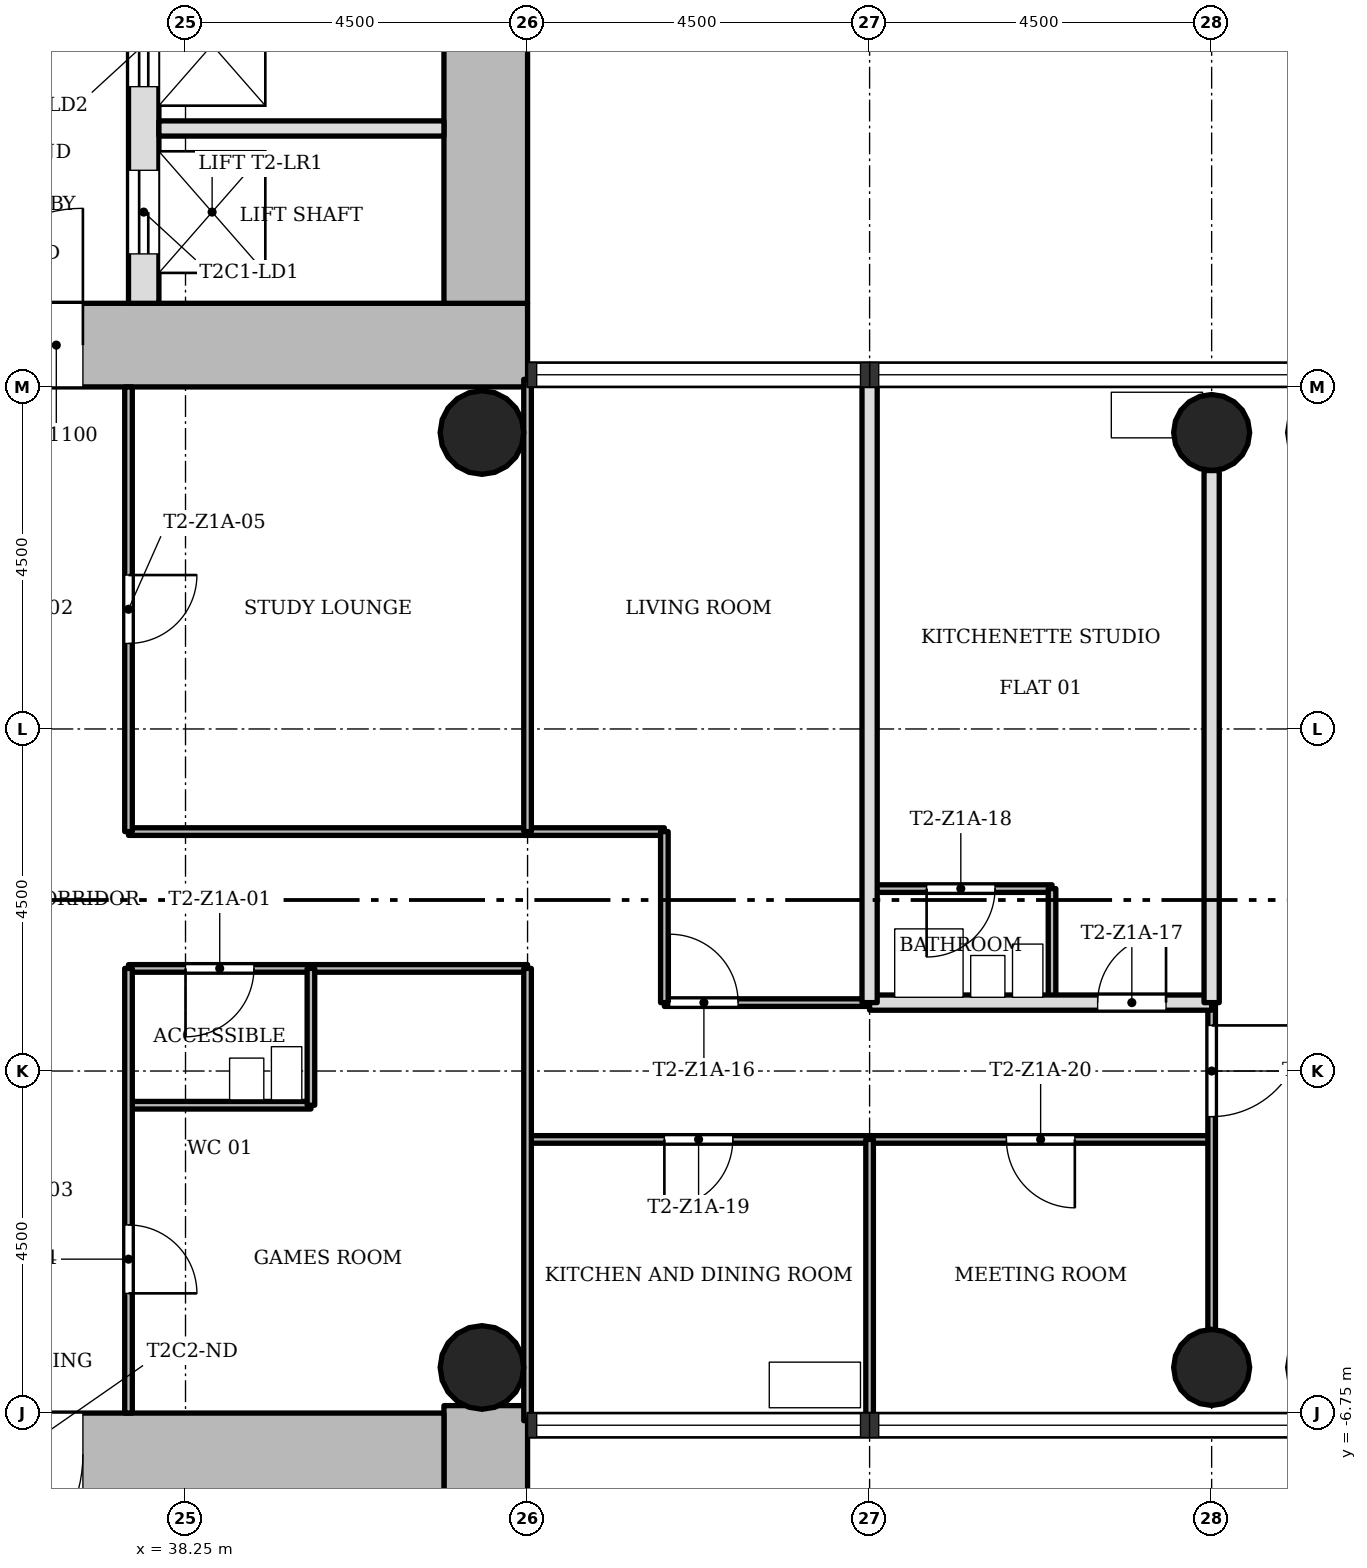
"""IFC4 building model, lengths in metres.
Left out: names, types, materials, properties, quantities, classifications, styles, units other than length and angle.
Written with IfcOpenShell. Run it as: python <this file> out.ifc"""

import sys

from ifc_helpers import new_model, si_unit, direction, frame, frame_2d, origin, origin_2d, place, context, subcontext, project, spatial, rectangle, hollow_circle, extrude, element, fill, save


model = new_model("IFC4")
c1 = context("Model", 3, precision=1e-05, world=origin(), true_north=direction((0.0, 1.0)))
c2 = subcontext(c1, "Body", "Model", "MODEL_VIEW")
j1 = project(units=[si_unit("LENGTHUNIT", "METRE"), si_unit("PLANEANGLEUNIT", "RADIAN")], contexts=[c1])
p1 = place(None, origin())
s1 = spatial("IfcSite", under=j1, at=p1, CompositionType="ELEMENT")
p2 = place(p1, origin())
s2 = spatial("IfcBuilding", under=s1, at=p2, CompositionType="ELEMENT")
p3 = place(p2, frame((0.0, 0.0, 27.9)))
s3 = spatial("IfcBuildingStorey", under=s2, at=p3, CompositionType="ELEMENT", Elevation=27.9)
p4 = place(p3, frame((30.35, 7.3, 0.0), z_axis=(0.0, 0.0, 1.0), x_axis=(1.0, 0.0, 0.0)))
e1 = element("IfcWall", 1, at=p4, inside=s3, PredefinedType="SHEAR", context=c2, shape_type="SweptSolid", body=[
    extrude(rectangle(XDim=12.4, YDim=1.1, at=frame_2d((6.2, 0.0))), origin(), (0.0, 0.0, 1.0), 3.4),
])
p5 = place(p4, frame((4.75, 0.0, 0.0)))
e2 = element("IfcOpeningElement", 2, at=p5, cuts=e1, PredefinedType="OPENING", context=c2, shape_type="SweptSolid", body=[
    extrude(rectangle(XDim=1.8, YDim=2.1, at=frame_2d((0.9, 1.05))), frame((0.0, 0.56, 0.0), z_axis=(0.0, -1.0, 0.0), x_axis=(1.0, 0.0, 0.0)), (0.0, 0.0, 1.0), 1.12),
])
p6 = place(p3, frame((42.2, 7.85, 0.0), z_axis=(0.0, 0.0, 1.0), x_axis=(0.0, 1.0, 0.0)))
e3 = element("IfcWall", 3, at=p6, inside=s3, PredefinedType="SHEAR", context=c2, shape_type="SweptSolid", body=[
    extrude(rectangle(XDim=7.9, YDim=1.1, at=frame_2d((3.95, 0.0))), origin(), (0.0, 0.0, 1.0), 3.4),
])
p7 = place(p3, frame((37.7, 7.85, 0.0), z_axis=(0.0, 0.0, 1.0), x_axis=(0.0, 1.0, 0.0)))
e4 = element("IfcWall", 4, at=p7, inside=s3, PredefinedType="SHEAR", context=c2, shape_type="SweptSolid", body=[
    extrude(rectangle(XDim=6.8, YDim=0.4, at=frame_2d((3.4, 0.0))), origin(), (0.0, 0.0, 1.0), 3.4),
])
p8 = place(p7, frame((0.65, 0.0, 0.0)))
e5 = element("IfcOpeningElement", 5, at=p8, cuts=e4, PredefinedType="OPENING", context=c2, shape_type="SweptSolid", body=[
    extrude(rectangle(XDim=1.1, YDim=2.1, at=frame_2d((0.55, 1.05))), frame((0.0, 0.21, 0.0), z_axis=(0.0, -1.0, 0.0), x_axis=(1.0, 0.0, 0.0)), (0.0, 0.0, 1.0), 0.42),
])
p9 = place(p7, frame((2.85, 0.0, 0.0)))
e6 = element("IfcOpeningElement", 6, at=p9, cuts=e4, PredefinedType="OPENING", context=c2, shape_type="SweptSolid", body=[
    extrude(rectangle(XDim=1.1, YDim=2.1, at=frame_2d((0.55, 1.05))), frame((0.0, 0.21, 0.0), z_axis=(0.0, -1.0, 0.0), x_axis=(1.0, 0.0, 0.0)), (0.0, 0.0, 1.0), 0.42),
])
p10 = place(p7, frame((5.05, 0.0, 0.0)))
e7 = element("IfcOpeningElement", 7, at=p10, cuts=e4, PredefinedType="OPENING", context=c2, shape_type="SweptSolid", body=[
    extrude(rectangle(XDim=1.1, YDim=2.1, at=frame_2d((0.55, 1.05))), frame((0.0, 0.21, 0.0), z_axis=(0.0, -1.0, 0.0), x_axis=(1.0, 0.0, 0.0)), (0.0, 0.0, 1.0), 0.42),
])
p11 = place(p3, frame((42.2, -15.248, 0.0), z_axis=(0.0, 0.0, 1.0), x_axis=(0.0, 1.0, 0.0)))
e8 = element("IfcWall", 8, at=p11, inside=s3, PredefinedType="SHEAR", context=c2, shape_type="SweptSolid", body=[
    extrude(rectangle(XDim=8.596, YDim=1.1, at=frame_2d((4.298, 0.0))), origin(), (0.0, 0.0, 1.0), 3.4),
])
p12 = place(p3, frame((41.65, -7.3, 0.0), z_axis=(0.0, 0.0, 1.0), x_axis=(-1.0, 0.0, 0.0)))
e9 = element("IfcWall", 9, at=p12, inside=s3, PredefinedType="SHEAR", context=c2, shape_type="SweptSolid", body=[
    extrude(rectangle(XDim=12.4, YDim=1.1, at=frame_2d((6.2, 0.0))), origin(), (0.0, 0.0, 1.0), 3.4),
])
p13 = place(p12, frame((4.75, 0.0, 0.0)))
e10 = element("IfcOpeningElement", 10, at=p13, cuts=e9, PredefinedType="OPENING", context=c2, shape_type="SweptSolid", body=[
    extrude(rectangle(XDim=1.8, YDim=2.1, at=frame_2d((0.9, 1.05))), frame((0.0, 0.56, 0.0), z_axis=(0.0, -1.0, 0.0), x_axis=(1.0, 0.0, 0.0)), (0.0, 0.0, 1.0), 1.12),
])
for number, where, z_axis, x_axis in (
    (11, (51.75, -6.15, 0.0), (0.0, 0.0, 1.0), (1.0, 0.0, 0.0)),
    (12, (51.75, 6.15, 0.0), (0.0, 0.0, 1.0), (1.0, 0.0, 0.0)),
):
    element("IfcColumn", number, at=place(p3, frame(where, z_axis=z_axis, x_axis=x_axis)), inside=s3, PredefinedType="COLUMN", context=c2, shape_type="SweptSolid", body=[
        extrude(hollow_circle(Radius=0.5, WallThickness=0.036, at=origin_2d()), origin(), (0.0, 0.0, 1.0), 3.4),
    ])
for number, where, z_axis, x_axis in (
    (13, (42.15, -6.15, 0.0), (0.0, 0.0, 1.0), (1.0, 0.0, 0.0)),
    (14, (42.15, 6.15, 0.0), (0.0, 0.0, 1.0), (1.0, 0.0, 0.0)),
):
    element("IfcColumn", number, at=place(p3, frame(where, z_axis=z_axis, x_axis=x_axis)), inside=s3, PredefinedType="COLUMN", context=c2, shape_type="SweptSolid", body=[
        extrude(hollow_circle(Radius=0.55, WallThickness=0.04, at=origin_2d()), origin(), (0.0, 0.0, 1.0), 3.4),
    ])
p14 = place(p3, frame((41.65, 10.15, 0.0), z_axis=(0.0, 0.0, 1.0), x_axis=(-1.0, 0.0, 0.0)))
e15 = element("IfcWall", 15, at=p14, inside=s3, PredefinedType="SOLIDWALL", context=c2, shape_type="SweptSolid", body=[
    extrude(rectangle(XDim=3.75, YDim=0.2, at=frame_2d((1.875, 0.0))), origin(), (0.0, 0.0, 1.0), 3.0),
])
p15 = place(p3, frame((51.75, -3.15, 0.0), z_axis=(0.0, 0.0, 1.0), x_axis=(-1.0, 0.0, 0.0)))
e16 = element("IfcWall", 16, at=p15, inside=s3, PredefinedType="PARTITIONING", context=c2, shape_type="SweptSolid", body=[
    extrude(rectangle(XDim=9.0, YDim=0.1, at=frame_2d((4.5, 0.0))), origin(), (0.0, 0.0, 1.0), 3.0),
])
p16 = place(p15, frame((6.3, 0.0, 0.0)))
e17 = element("IfcOpeningElement", 17, at=p16, cuts=e16, PredefinedType="OPENING", context=c2, shape_type="SweptSolid", body=[
    extrude(rectangle(XDim=0.9, YDim=2.1, at=frame_2d((0.45, 1.05))), frame((0.0, 0.06, 0.0), z_axis=(0.0, -1.0, 0.0), x_axis=(1.0, 0.0, 0.0)), (0.0, 0.0, 1.0), 0.12),
])
p17 = place(p15, frame((1.8, 0.0, 0.0)))
e18 = element("IfcOpeningElement", 18, at=p17, cuts=e16, PredefinedType="OPENING", context=c2, shape_type="SweptSolid", body=[
    extrude(rectangle(XDim=0.9, YDim=2.1, at=frame_2d((0.45, 1.05))), frame((0.0, 0.06, 0.0), z_axis=(0.0, -1.0, 0.0), x_axis=(1.0, 0.0, 0.0)), (0.0, 0.0, 1.0), 0.12),
])
p18 = place(p3, frame((39.9, -2.7, 0.0), z_axis=(0.0, 0.0, 1.0), x_axis=(-1.0, 0.0, 0.0)))
e19 = element("IfcWall", 19, at=p18, inside=s3, PredefinedType="PARTITIONING", context=c2, shape_type="SweptSolid", body=[
    extrude(rectangle(XDim=2.4, YDim=0.1, at=frame_2d((1.2, 0.0))), origin(), (0.0, 0.0, 1.0), 3.0),
])
p19 = place(p3, frame((47.25, -1.35, 0.0), z_axis=(0.0, 0.0, 1.0), x_axis=(-1.0, 0.0, 0.0)))
e20 = element("IfcWall", 20, at=p19, inside=s3, PredefinedType="PARTITIONING", context=c2, shape_type="SweptSolid", body=[
    extrude(rectangle(XDim=2.7, YDim=0.1, at=frame_2d((1.35, 0.0))), origin(), (0.0, 0.0, 1.0), 3.0),
])
p20 = place(p19, frame((1.73, 0.0, 0.0)))
e21 = element("IfcOpeningElement", 21, at=p20, cuts=e20, PredefinedType="OPENING", context=c2, shape_type="SweptSolid", body=[
    extrude(rectangle(XDim=0.9, YDim=2.1, at=frame_2d((0.45, 1.05))), frame((0.0, 0.06, 0.0), z_axis=(0.0, -1.0, 0.0), x_axis=(1.0, 0.0, 0.0)), (0.0, 0.0, 1.0), 0.12),
])
p21 = place(p3, frame((51.75, -1.35, 0.0), z_axis=(0.0, 0.0, 1.0), x_axis=(-1.0, 0.0, 0.0)))
e22 = element("IfcWall", 22, at=p21, inside=s3, PredefinedType="SOLIDWALL", context=c2, shape_type="SweptSolid", body=[
    extrude(rectangle(XDim=4.5, YDim=0.2, at=frame_2d((2.25, 0.0))), origin(), (0.0, 0.0, 1.0), 3.0),
])
p22 = place(p21, frame((0.6, 0.0, 0.0)))
e23 = element("IfcOpeningElement", 23, at=p22, cuts=e22, PredefinedType="OPENING", context=c2, shape_type="SweptSolid", body=[
    extrude(rectangle(XDim=0.9, YDim=2.1, at=frame_2d((0.45, 1.05))), frame((0.0, 0.11, 0.0), z_axis=(0.0, -1.0, 0.0), x_axis=(1.0, 0.0, 0.0)), (0.0, 0.0, 1.0), 0.22),
])
p23 = place(p3, frame((42.75, -0.9, 0.0), z_axis=(0.0, 0.0, 1.0), x_axis=(-1.0, 0.0, 0.0)))
e24 = element("IfcWall", 24, at=p23, inside=s3, PredefinedType="PARTITIONING", context=c2, shape_type="SweptSolid", body=[
    extrude(rectangle(XDim=5.25, YDim=0.1, at=frame_2d((2.625, 0.0))), origin(), (0.0, 0.0, 1.0), 3.0),
])
p24 = place(p23, frame((3.6, 0.0, 0.0)))
e25 = element("IfcOpeningElement", 25, at=p24, cuts=e24, PredefinedType="OPENING", context=c2, shape_type="SweptSolid", body=[
    extrude(rectangle(XDim=0.9, YDim=2.1, at=frame_2d((0.45, 1.05))), frame((0.0, 0.06, 0.0), z_axis=(0.0, -1.0, 0.0), x_axis=(1.0, 0.0, 0.0)), (0.0, 0.0, 1.0), 0.12),
])
p25 = place(p3, frame((49.65, 0.15, 0.0), z_axis=(0.0, 0.0, 1.0), x_axis=(-1.0, 0.0, 0.0)))
e26 = element("IfcWall", 26, at=p25, inside=s3, PredefinedType="PARTITIONING", context=c2, shape_type="SweptSolid", body=[
    extrude(rectangle(XDim=2.4, YDim=0.1, at=frame_2d((1.2, 0.0))), origin(), (0.0, 0.0, 1.0), 3.0),
])
p26 = place(p25, frame((0.75, 0.0, 0.0)))
e27 = element("IfcOpeningElement", 27, at=p26, cuts=e26, PredefinedType="OPENING", context=c2, shape_type="SweptSolid", body=[
    extrude(rectangle(XDim=0.9, YDim=2.1, at=frame_2d((0.45, 1.05))), frame((0.0, 0.06, 0.0), z_axis=(0.0, -1.0, 0.0), x_axis=(1.0, 0.0, 0.0)), (0.0, 0.0, 1.0), 0.12),
])
p27 = place(p3, frame((44.55, 0.9, 0.0), z_axis=(0.0, 0.0, 1.0), x_axis=(-1.0, 0.0, 0.0)))
e28 = element("IfcWall", 28, at=p27, inside=s3, PredefinedType="PARTITIONING", context=c2, shape_type="SweptSolid", body=[
    extrude(rectangle(XDim=7.05, YDim=0.1, at=frame_2d((3.525, 0.0))), origin(), (0.0, 0.0, 1.0), 3.0),
])
p28 = place(p3, frame((51.75, -5.65, 0.0), z_axis=(0.0, 0.0, 1.0), x_axis=(0.0, 1.0, 0.0)))
e29 = element("IfcWall", 29, at=p28, inside=s3, PredefinedType="PARTITIONING", context=c2, shape_type="SweptSolid", body=[
    extrude(rectangle(XDim=4.3, YDim=0.1, at=frame_2d((2.15, 0.0))), origin(), (0.0, 0.0, 1.0), 3.0),
])
p29 = place(p28, frame((2.8, 0.0, 0.0)))
e30 = element("IfcOpeningElement", 30, at=p29, cuts=e29, PredefinedType="OPENING", context=c2, shape_type="SweptSolid", body=[
    extrude(rectangle(XDim=1.2, YDim=2.1, at=frame_2d((0.6, 1.05))), frame((0.0, 0.06, 0.0), z_axis=(0.0, -1.0, 0.0), x_axis=(1.0, 0.0, 0.0)), (0.0, 0.0, 1.0), 0.12),
])
p30 = place(p3, frame((51.75, -1.35, 0.0), z_axis=(0.0, 0.0, 1.0), x_axis=(0.0, 1.0, 0.0)))
e31 = element("IfcWall", 31, at=p30, inside=s3, PredefinedType="SOLIDWALL", context=c2, shape_type="SweptSolid", body=[
    extrude(rectangle(XDim=7.0, YDim=0.2, at=frame_2d((3.5, 0.0))), origin(), (0.0, 0.0, 1.0), 3.0),
])
p31 = place(p3, frame((49.65, -1.35, 0.0), z_axis=(0.0, 0.0, 1.0), x_axis=(0.0, 1.0, 0.0)))
e32 = element("IfcWall", 32, at=p31, inside=s3, PredefinedType="PARTITIONING", context=c2, shape_type="SweptSolid", body=[
    extrude(rectangle(XDim=1.5, YDim=0.1, at=frame_2d((0.75, 0.0))), origin(), (0.0, 0.0, 1.0), 3.0),
])
p32 = place(p3, frame((47.25, -6.85, 0.0), z_axis=(0.0, 0.0, 1.0), x_axis=(0.0, 1.0, 0.0)))
e33 = element("IfcWall", 33, at=p32, inside=s3, PredefinedType="PARTITIONING", context=c2, shape_type="SweptSolid", body=[
    extrude(rectangle(XDim=3.7, YDim=0.1, at=frame_2d((1.85, 0.0))), origin(), (0.0, 0.0, 1.0), 3.0),
])
p33 = place(p3, frame((47.25, -1.35, 0.0), z_axis=(0.0, 0.0, 1.0), x_axis=(0.0, 1.0, 0.0)))
e34 = element("IfcWall", 34, at=p33, inside=s3, PredefinedType="SOLIDWALL", context=c2, shape_type="SweptSolid", body=[
    extrude(rectangle(XDim=8.2, YDim=0.2, at=frame_2d((4.1, 0.0))), origin(), (0.0, 0.0, 1.0), 3.0),
])
p34 = place(p3, frame((44.55, -1.35, 0.0), z_axis=(0.0, 0.0, 1.0), x_axis=(0.0, 1.0, 0.0)))
e35 = element("IfcWall", 35, at=p34, inside=s3, PredefinedType="PARTITIONING", context=c2, shape_type="SweptSolid", body=[
    extrude(rectangle(XDim=2.25, YDim=0.1, at=frame_2d((1.125, 0.0))), origin(), (0.0, 0.0, 1.0), 3.0),
])
for number, where, z_axis, x_axis in (
    (36, (42.75, -6.85, 0.0), (0.0, 0.0, 1.0), (0.0, 1.0, 0.0)),
    (37, (42.75, 0.9, 0.0), (0.0, 0.0, 1.0), (0.0, 1.0, 0.0)),
):
    element("IfcWall", number, at=place(p3, frame(where, z_axis=z_axis, x_axis=x_axis)), inside=s3, PredefinedType="PARTITIONING", context=c2, shape_type="SweptSolid", body=[
        extrude(rectangle(XDim=5.95, YDim=0.1, at=frame_2d((2.975, 0.0))), origin(), (0.0, 0.0, 1.0), 3.0),
    ])
p35 = place(p3, frame((39.9, -2.7, 0.0), z_axis=(0.0, 0.0, 1.0), x_axis=(0.0, 1.0, 0.0)))
e38 = element("IfcWall", 38, at=p35, inside=s3, PredefinedType="PARTITIONING", context=c2, shape_type="SweptSolid", body=[
    extrude(rectangle(XDim=1.8, YDim=0.1, at=frame_2d((0.9, 0.0))), origin(), (0.0, 0.0, 1.0), 3.0),
])
p36 = place(p3, frame((37.5, -6.75, 0.0), z_axis=(0.0, 0.0, 1.0), x_axis=(0.0, 1.0, 0.0)))
e39 = element("IfcWall", 39, at=p36, inside=s3, PredefinedType="PARTITIONING", context=c2, shape_type="SweptSolid", body=[
    extrude(rectangle(XDim=5.85, YDim=0.1, at=frame_2d((2.925, 0.0))), origin(), (0.0, 0.0, 1.0), 3.0),
])
p37 = place(p36, frame((1.575, 0.0, 0.0)))
e40 = element("IfcOpeningElement", 40, at=p37, cuts=e39, PredefinedType="OPENING", context=c2, shape_type="SweptSolid", body=[
    extrude(rectangle(XDim=0.9, YDim=2.1, at=frame_2d((0.45, 1.05))), frame((0.0, 0.06, 0.0), z_axis=(0.0, -1.0, 0.0), x_axis=(1.0, 0.0, 0.0)), (0.0, 0.0, 1.0), 0.12),
])
p38 = place(p3, frame((37.5, 0.9, 0.0), z_axis=(0.0, 0.0, 1.0), x_axis=(0.0, 1.0, 0.0)))
e41 = element("IfcWall", 41, at=p38, inside=s3, PredefinedType="PARTITIONING", context=c2, shape_type="SweptSolid", body=[
    extrude(rectangle(XDim=5.85, YDim=0.1, at=frame_2d((2.925, 0.0))), origin(), (0.0, 0.0, 1.0), 3.0),
])
p39 = place(p38, frame((2.475, 0.0, 0.0)))
e42 = element("IfcOpeningElement", 42, at=p39, cuts=e41, PredefinedType="OPENING", context=c2, shape_type="SweptSolid", body=[
    extrude(rectangle(XDim=0.9, YDim=2.1, at=frame_2d((0.45, 1.05))), frame((0.0, 0.06, 0.0), z_axis=(0.0, -1.0, 0.0), x_axis=(1.0, 0.0, 0.0)), (0.0, 0.0, 1.0), 0.12),
])
p40 = place(p24, origin())
e43 = element("IfcDoor", 43, at=p40, inside=s3, OperationType="SINGLE_SWING_LEFT", PredefinedType="DOOR", context=c2, shape_type="SweptSolid", body=[
    extrude(rectangle(XDim=0.9, YDim=2.1, at=frame_2d((0.45, 1.05))), frame((0.0, 0.025, 0.0), z_axis=(0.0, -1.0, 0.0), x_axis=(1.0, 0.0, 0.0)), (0.0, 0.0, 1.0), 0.05),
])
fill(e25, e43)
p41 = place(p37, origin())
e44 = element("IfcDoor", 44, at=p41, inside=s3, OperationType="SINGLE_SWING_LEFT", PredefinedType="DOOR", context=c2, shape_type="SweptSolid", body=[
    extrude(rectangle(XDim=0.9, YDim=2.1, at=frame_2d((0.45, 1.05))), frame((0.0, 0.025, 0.0), z_axis=(0.0, -1.0, 0.0), x_axis=(1.0, 0.0, 0.0)), (0.0, 0.0, 1.0), 0.05),
])
fill(e40, e44)
p42 = place(p39, origin())
e45 = element("IfcDoor", 45, at=p42, inside=s3, OperationType="SINGLE_SWING_RIGHT", PredefinedType="DOOR", context=c2, shape_type="SweptSolid", body=[
    extrude(rectangle(XDim=0.9, YDim=2.1, at=frame_2d((0.45, 1.05))), frame((0.0, 0.025, 0.0), z_axis=(0.0, -1.0, 0.0), x_axis=(1.0, 0.0, 0.0)), (0.0, 0.0, 1.0), 0.05),
])
fill(e42, e45)
p43 = place(p20, origin())
e46 = element("IfcDoor", 46, at=p43, inside=s3, OperationType="SINGLE_SWING_RIGHT", PredefinedType="DOOR", context=c2, shape_type="SweptSolid", body=[
    extrude(rectangle(XDim=0.9, YDim=2.1, at=frame_2d((0.45, 1.05))), frame((0.0, 0.025, 0.0), z_axis=(0.0, -1.0, 0.0), x_axis=(1.0, 0.0, 0.0)), (0.0, 0.0, 1.0), 0.05),
])
fill(e21, e46)
p44 = place(p22, origin())
e47 = element("IfcDoor", 47, at=p44, inside=s3, OperationType="SINGLE_SWING_LEFT", PredefinedType="DOOR", context=c2, shape_type="SweptSolid", body=[
    extrude(rectangle(XDim=0.9, YDim=2.1, at=frame_2d((0.45, 1.05))), frame((0.0, 0.025, 0.0), z_axis=(0.0, -1.0, 0.0), x_axis=(1.0, 0.0, 0.0)), (0.0, 0.0, 1.0), 0.05),
])
fill(e23, e47)
p45 = place(p26, origin())
e48 = element("IfcDoor", 48, at=p45, inside=s3, OperationType="SINGLE_SWING_LEFT", PredefinedType="DOOR", context=c2, shape_type="SweptSolid", body=[
    extrude(rectangle(XDim=0.9, YDim=2.1, at=frame_2d((0.45, 1.05))), frame((0.0, 0.025, 0.0), z_axis=(0.0, -1.0, 0.0), x_axis=(1.0, 0.0, 0.0)), (0.0, 0.0, 1.0), 0.05),
])
fill(e27, e48)
p46 = place(p16, origin())
e49 = element("IfcDoor", 49, at=p46, inside=s3, OperationType="SINGLE_SWING_LEFT", PredefinedType="DOOR", context=c2, shape_type="SweptSolid", body=[
    extrude(rectangle(XDim=0.9, YDim=2.1, at=frame_2d((0.45, 1.05))), frame((0.0, 0.025, 0.0), z_axis=(0.0, -1.0, 0.0), x_axis=(1.0, 0.0, 0.0)), (0.0, 0.0, 1.0), 0.05),
])
fill(e17, e49)
p47 = place(p17, origin())
e50 = element("IfcDoor", 50, at=p47, inside=s3, OperationType="SINGLE_SWING_RIGHT", PredefinedType="DOOR", context=c2, shape_type="SweptSolid", body=[
    extrude(rectangle(XDim=0.9, YDim=2.1, at=frame_2d((0.45, 1.05))), frame((0.0, 0.025, 0.0), z_axis=(0.0, -1.0, 0.0), x_axis=(1.0, 0.0, 0.0)), (0.0, 0.0, 1.0), 0.05),
])
fill(e18, e50)
p48 = place(p29, origin())
e51 = element("IfcDoor", 51, at=p48, inside=s3, OperationType="SINGLE_SWING_RIGHT", PredefinedType="DOOR", context=c2, shape_type="SweptSolid", body=[
    extrude(rectangle(XDim=1.2, YDim=2.1, at=frame_2d((0.6, 1.05))), frame((0.0, 0.025, 0.0), z_axis=(0.0, -1.0, 0.0), x_axis=(1.0, 0.0, 0.0)), (0.0, 0.0, 1.0), 0.05),
])
fill(e30, e51)
p49 = place(p8, origin())
e52 = element("IfcDoor", 52, at=p49, inside=s3, OperationType="SLIDING_TO_LEFT", PredefinedType="DOOR", context=c2, shape_type="SweptSolid", body=[
    extrude(rectangle(XDim=1.1, YDim=2.1, at=frame_2d((0.55, 1.05))), frame((0.0, 0.025, 0.0), z_axis=(0.0, -1.0, 0.0), x_axis=(1.0, 0.0, 0.0)), (0.0, 0.0, 1.0), 0.05),
])
fill(e5, e52)
p50 = place(p9, origin())
e53 = element("IfcDoor", 53, at=p50, inside=s3, OperationType="SLIDING_TO_LEFT", PredefinedType="DOOR", context=c2, shape_type="SweptSolid", body=[
    extrude(rectangle(XDim=1.1, YDim=2.1, at=frame_2d((0.55, 1.05))), frame((0.0, 0.025, 0.0), z_axis=(0.0, -1.0, 0.0), x_axis=(1.0, 0.0, 0.0)), (0.0, 0.0, 1.0), 0.05),
])
fill(e6, e53)
p51 = place(p5, origin())
e54 = element("IfcDoor", 54, at=p51, inside=s3, OperationType="SINGLE_SWING_LEFT", PredefinedType="DOOR", context=c2, shape_type="SweptSolid", body=[
    extrude(rectangle(XDim=1.8, YDim=2.1, at=frame_2d((0.9, 1.05))), frame((0.0, 0.025, 0.0), z_axis=(0.0, -1.0, 0.0), x_axis=(1.0, 0.0, 0.0)), (0.0, 0.0, 1.0), 0.05),
])
fill(e2, e54)
p52 = place(p13, origin())
e55 = element("IfcDoor", 55, at=p52, inside=s3, OperationType="SINGLE_SWING_LEFT", PredefinedType="DOOR", context=c2, shape_type="SweptSolid", body=[
    extrude(rectangle(XDim=1.8, YDim=2.1, at=frame_2d((0.9, 1.05))), frame((0.0, 0.025, 0.0), z_axis=(0.0, -1.0, 0.0), x_axis=(1.0, 0.0, 0.0)), (0.0, 0.0, 1.0), 0.05),
])
fill(e10, e55)
save(model, sys.argv[1])
